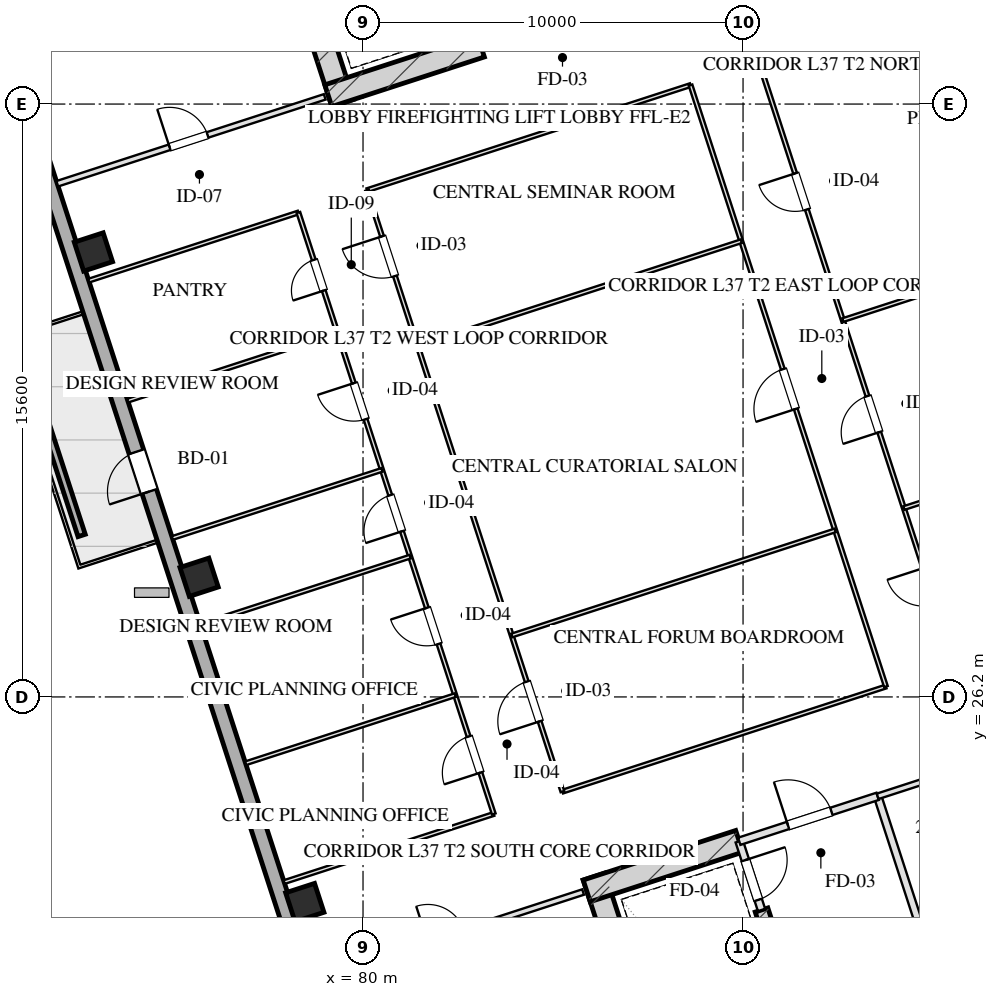
"""IFC4 building model, lengths in metres.
Left out: names, types, materials, properties, quantities, classifications, styles, units other than length and angle.
Written with IfcOpenShell. Run it as: python <this file> out.ifc"""

import sys

from ifc_helpers import new_model, si_unit, direction, frame, frame_2d, origin, origin_2d, place, context, subcontext, project, spatial, rectangle, hollow_rectangle, extrude, element, fill, save


model = new_model("IFC4")
c1 = context("Model", 3, precision=1e-05, world=origin(), true_north=direction((0.0, 1.0)))
c2 = subcontext(c1, "Body", "Model", "MODEL_VIEW")
j1 = project(units=[si_unit("LENGTHUNIT", "METRE"), si_unit("PLANEANGLEUNIT", "RADIAN")], contexts=[c1])
p1 = place(None, origin())
s1 = spatial("IfcSite", under=j1, at=p1, CompositionType="ELEMENT")
p2 = place(p1, origin())
s2 = spatial("IfcBuilding", under=s1, at=p2, CompositionType="ELEMENT")
p3 = place(p2, frame((0.0, 0.0, 142.6)))
s3 = spatial("IfcBuildingStorey", under=s2, at=p3, CompositionType="ELEMENT", Elevation=142.6)
p4 = place(p3, frame((86.078, 21.475, 0.0), z_axis=(0.0, 0.0, 1.0), x_axis=(0.309017938678, -0.951056209472, 0.0)))
e1 = element("IfcWall", 1, at=p4, inside=s3, PredefinedType="SHEAR", context=c2, shape_type="SweptSolid", body=[
    extrude(rectangle(XDim=9.48, YDim=0.6, at=frame_2d((4.74, 0.0))), origin(), (0.0, 0.0, 1.0), 3.45),
])
p5 = place(p3, frame((90.486, 20.594, 0.0), z_axis=(0.0, 0.0, 1.0), x_axis=(0.309020428229, -0.951055400562, 0.0)))
e2 = element("IfcWall", 2, at=p5, inside=s3, PredefinedType="SHEAR", context=c2, shape_type="SweptSolid", body=[
    extrude(rectangle(XDim=6.98, YDim=0.35, at=frame_2d((3.49, 0.0))), origin(), (0.0, 0.0, 1.0), 3.45),
])
p6 = place(p3, frame((85.886, 21.097, 0.0), z_axis=(0.0, 0.0, 1.0), x_axis=(0.951068073652, 0.308981422225, 0.0)))
e3 = element("IfcWall", 3, at=p6, inside=s3, PredefinedType="SHEAR", context=c2, shape_type="SweptSolid", body=[
    extrude(rectangle(XDim=4.22, YDim=0.6, at=frame_2d((2.11, 0.0))), origin(), (0.0, 0.0, 1.0), 3.45),
])
p7 = place(p3, frame((79.466, 41.828, 0.0), z_axis=(0.0, 0.0, 1.0), x_axis=(-0.309041232772, 0.951048640421, 0.0)))
e4 = element("IfcWall", 4, at=p7, inside=s3, PredefinedType="SHEAR", context=c2, shape_type="SweptSolid", body=[
    extrude(rectangle(XDim=9.48, YDim=0.6, at=frame_2d((4.74, 0.0))), origin(), (0.0, 0.0, 1.0), 3.45),
])
p8 = place(p3, frame((79.087, 42.021, 0.0), z_axis=(0.0, 0.0, 1.0), x_axis=(0.951062550203, 0.3089984233, 0.0)))
e5 = element("IfcWall", 5, at=p8, inside=s3, PredefinedType="SHEAR", context=c2, shape_type="SweptSolid", body=[
    extrude(rectangle(XDim=4.22, YDim=0.6, at=frame_2d((2.11, 0.0))), origin(), (0.0, 0.0, 1.0), 3.45),
])
for number, where, z_axis, x_axis in (
    (6, (78.468, 20.79, 0.0), (0.0, 0.0, 1.0), (0.951, 0.309, 0.0)),
    (7, (75.687, 29.349, 0.0), (0.0, 0.0, 1.0), (0.951, 0.309, 0.0)),
    (8, (72.906, 37.909, 0.0), (0.0, 0.0, 1.0), (0.951, 0.309, 0.0)),
):
    element("IfcColumn", number, at=place(p3, frame(where, z_axis=z_axis, x_axis=x_axis)), inside=s3, PredefinedType="COLUMN", context=c2, shape_type="SweptSolid", body=[
        extrude(hollow_rectangle(XDim=0.8, YDim=0.8, WallThickness=0.028, at=origin_2d()), origin(), (0.0, 0.0, 1.0), 3.451),
    ])
p9 = place(p3, frame((81.776, 8.827, 0.0), z_axis=(0.0, 0.0, 1.0), x_axis=(-0.309014228706, 0.951057414911, 0.0)))
e9 = element("IfcWall", 9, at=p9, inside=s3, PredefinedType="SOLIDWALL", context=c2, shape_type="SweptSolid", body=[
    extrude(rectangle(XDim=42.8, YDim=0.4, at=frame_2d((21.4, 0.0))), origin(), (0.0, 0.0, 1.0), 2.61),
])
p10 = place(p9, frame((23.95, 0.0, 0.0)))
e10 = element("IfcOpeningElement", 10, at=p10, cuts=e9, PredefinedType="OPENING", context=c2, shape_type="SweptSolid", body=[
    extrude(rectangle(XDim=1.1, YDim=2.15, at=frame_2d((0.55, 1.075))), frame((0.0, 0.21, 0.0), z_axis=(0.0, -1.0, 0.0), x_axis=(1.0, 0.0, 0.0)), (0.0, 0.0, 1.0), 0.42),
])
p11 = place(p3, frame((72.596, 30.448, 0.0), z_axis=(0.0, 0.0, 1.0), x_axis=(-0.30900096172, 0.951061725471, 0.0)))
e11 = element("IfcWall", 11, at=p11, inside=s3, PredefinedType="PARAPET", context=c2, shape_type="SweptSolid", body=[
    extrude(rectangle(XDim=4.8, YDim=0.2, at=frame_2d((2.4, 0.0))), origin(), (0.0, 0.0, 1.0), 0.75),
])
p12 = place(p3, frame((89.899, 22.401, 0.0), z_axis=(0.0, 0.0, 1.0), x_axis=(0.308932062672, -0.951084108086, 0.0)))
e12 = element("IfcWall", 12, at=p12, inside=s3, PredefinedType="PARTITIONING", context=c2, shape_type="SweptSolid", body=[
    extrude(rectangle(XDim=1.9, YDim=0.2, at=frame_2d((0.95, 0.0))), origin(), (0.0, 0.0, 1.0), 3.175),
])
p13 = place(p12, frame((0.52, 0.0, 0.0)))
e13 = element("IfcOpeningElement", 13, at=p13, cuts=e12, PredefinedType="OPENING", context=c2, shape_type="SweptSolid", body=[
    extrude(rectangle(XDim=1.1, YDim=2.05, at=frame_2d((0.55, 1.025))), frame((0.0, 0.11, 0.0), z_axis=(0.0, -1.0, 0.0), x_axis=(1.0, 0.0, 0.0)), (0.0, 0.0, 1.0), 0.22),
])
p14 = place(p3, frame((93.542, 23.585, 0.0), z_axis=(0.0, 0.0, 1.0), x_axis=(0.309042196757, -0.951048327176, 0.0)))
e14 = element("IfcWall", 14, at=p14, inside=s3, PredefinedType="PARTITIONING", context=c2, shape_type="SweptSolid", body=[
    extrude(rectangle(XDim=8.43, YDim=0.2, at=frame_2d((4.215, 0.0))), origin(), (0.0, 0.0, 1.0), 3.175),
])
p15 = place(p3, frame((89.899, 22.401, 0.0), z_axis=(0.0, 0.0, 1.0), x_axis=(0.951046716504, 0.309047153403, 0.0)))
e15 = element("IfcWall", 15, at=p15, inside=s3, PredefinedType="PARTITIONING", context=c2, shape_type="SweptSolid", body=[
    extrude(rectangle(XDim=3.83, YDim=0.2, at=frame_2d((1.915, 0.0))), origin(), (0.0, 0.0, 1.0), 3.175),
])
p16 = place(p15, frame((1.35, 0.0, 0.0)))
e16 = element("IfcOpeningElement", 16, at=p16, cuts=e15, PredefinedType="OPENING", context=c2, shape_type="SweptSolid", body=[
    extrude(rectangle(XDim=1.2, YDim=2.05, at=frame_2d((0.6, 1.025))), frame((0.0, 0.11, 0.0), z_axis=(0.0, -1.0, 0.0), x_axis=(1.0, 0.0, 0.0)), (0.0, 0.0, 1.0), 0.22),
])
p17 = place(p3, frame((93.542, 23.585, 0.0), z_axis=(0.0, 0.0, 1.0), x_axis=(0.951063829732, 0.308994485023, 0.0)))
e17 = element("IfcWall", 17, at=p17, inside=s3, PredefinedType="PARTITIONING", context=c2, shape_type="SweptSolid", body=[
    extrude(rectangle(XDim=4.4, YDim=0.15, at=frame_2d((2.2, 0.0))), origin(), (0.0, 0.0, 1.0), 3.175),
])
p18 = place(p17, frame((1.6, 0.0, 0.0)))
e18 = element("IfcOpeningElement", 18, at=p18, cuts=e17, PredefinedType="OPENING", context=c2, shape_type="SweptSolid", body=[
    extrude(rectangle(XDim=1.0, YDim=2.05, at=frame_2d((0.5, 1.025))), frame((0.0, 0.085, 0.0), z_axis=(0.0, -1.0, 0.0), x_axis=(1.0, 0.0, 0.0)), (0.0, 0.0, 1.0), 0.17),
])
p19 = place(p3, frame((78.753, 18.78, 0.0), z_axis=(0.0, 0.0, 1.0), x_axis=(0.951060977215, 0.309003264738, 0.0)))
e19 = element("IfcWall", 19, at=p19, inside=s3, PredefinedType="PARTITIONING", context=c2, shape_type="SweptSolid", body=[
    extrude(rectangle(XDim=7.4, YDim=0.15, at=frame_2d((3.7, 0.0))), origin(), (0.0, 0.0, 1.0), 3.175),
])
p20 = place(p19, frame((3.108, 0.0, 0.0)))
e20 = element("IfcOpeningElement", 20, at=p20, cuts=e19, PredefinedType="OPENING", context=c2, shape_type="SweptSolid", body=[
    extrude(rectangle(XDim=1.0, YDim=2.05, at=frame_2d((0.5, 1.025))), frame((0.0, 0.085, 0.0), z_axis=(0.0, -1.0, 0.0), x_axis=(1.0, 0.0, 0.0)), (0.0, 0.0, 1.0), 0.17),
])
p21 = place(p3, frame((71.955, 39.703, 0.0), z_axis=(0.0, 0.0, 1.0), x_axis=(0.951060977215, 0.309003264738, 0.0)))
e21 = element("IfcWall", 21, at=p21, inside=s3, PredefinedType="PARTITIONING", context=c2, shape_type="SweptSolid", body=[
    extrude(rectangle(XDim=7.4, YDim=0.15, at=frame_2d((3.7, 0.0))), origin(), (0.0, 0.0, 1.0), 3.175),
])
p22 = place(p21, frame((3.108, 0.0, 0.0)))
e22 = element("IfcOpeningElement", 22, at=p22, cuts=e21, PredefinedType="OPENING", context=c2, shape_type="SweptSolid", body=[
    extrude(rectangle(XDim=1.05, YDim=2.05, at=frame_2d((0.525, 1.025))), frame((0.0, 0.085, 0.0), z_axis=(0.0, -1.0, 0.0), x_axis=(1.0, 0.0, 0.0)), (0.0, 0.0, 1.0), 0.17),
])
p23 = place(p3, frame((77.925, 21.328, 0.0), z_axis=(0.0, 0.0, 1.0), x_axis=(0.951059431056, 0.309008023519, 0.0)))
e23 = element("IfcWall", 23, at=p23, inside=s3, PredefinedType="MOVABLE", context=c2, shape_type="SweptSolid", body=[
    extrude(rectangle(XDim=5.8, YDim=0.1, at=frame_2d((2.9, 0.0))), origin(), (0.0, 0.0, 1.0), 3.175),
])
p24 = place(p3, frame((85.248, 23.708, 0.0), z_axis=(0.0, 0.0, 1.0), x_axis=(0.951059123431, 0.309008970321, 0.0)))
e24 = element("IfcWall", 24, at=p24, inside=s3, PredefinedType="MOVABLE", context=c2, shape_type="SweptSolid", body=[
    extrude(rectangle(XDim=8.95, YDim=0.1, at=frame_2d((4.475, 0.0))), origin(), (0.0, 0.0, 1.0), 3.175),
])
p25 = place(p3, frame((72.783, 37.154, 0.0), z_axis=(0.0, 0.0, 1.0), x_axis=(0.951047059821, 0.309046096893, 0.0)))
e25 = element("IfcWall", 25, at=p25, inside=s3, PredefinedType="MOVABLE", context=c2, shape_type="SweptSolid", body=[
    extrude(rectangle(XDim=5.8, YDim=0.1, at=frame_2d((2.9, 0.0))), origin(), (0.0, 0.0, 1.0), 3.175),
])
p26 = place(p3, frame((80.106, 39.533, 0.0), z_axis=(0.0, 0.0, 1.0), x_axis=(0.951059123431, 0.309008970321, 0.0)))
e26 = element("IfcWall", 26, at=p26, inside=s3, PredefinedType="MOVABLE", context=c2, shape_type="SweptSolid", body=[
    extrude(rectangle(XDim=8.95, YDim=0.1, at=frame_2d((4.475, 0.0))), origin(), (0.0, 0.0, 1.0), 3.175),
])
p27 = place(p3, frame((90.425, 42.886, 0.0), z_axis=(0.0, 0.0, 1.0), x_axis=(0.95105749975, 0.309013967595, 0.0)))
e27 = element("IfcWall", 27, at=p27, inside=s3, PredefinedType="MOVABLE", context=c2, shape_type="SweptSolid", body=[
    extrude(rectangle(XDim=12.25, YDim=0.1, at=frame_2d((6.125, 0.0))), origin(), (0.0, 0.0, 1.0), 3.175),
])
p28 = place(p3, frame((83.441, 23.121, 0.0), z_axis=(0.0, 0.0, 1.0), x_axis=(-0.30901773025, 0.951056277195, 0.0)))
e28 = element("IfcWall", 28, at=p28, inside=s3, PredefinedType="MOVABLE", context=c2, shape_type="SweptSolid", body=[
    extrude(rectangle(XDim=16.64, YDim=0.1, at=frame_2d((8.32, 0.0))), origin(), (0.0, 0.0, 1.0), 3.175),
])
p29 = place(p28, frame((1.143, 0.0, 0.0)))
e29 = element("IfcOpeningElement", 29, at=p29, cuts=e28, PredefinedType="OPENING", context=c2, shape_type="SweptSolid", body=[
    extrude(rectangle(XDim=1.0, YDim=2.05, at=frame_2d((0.5, 1.025))), frame((0.0, 0.06, 0.0), z_axis=(0.0, -1.0, 0.0), x_axis=(1.0, 0.0, 0.0)), (0.0, 0.0, 1.0), 0.12),
])
p30 = place(p28, frame((4.703, 0.0, 0.0)))
e30 = element("IfcOpeningElement", 30, at=p30, cuts=e28, PredefinedType="OPENING", context=c2, shape_type="SweptSolid", body=[
    extrude(rectangle(XDim=1.0, YDim=2.05, at=frame_2d((0.5, 1.025))), frame((0.0, 0.06, 0.0), z_axis=(0.0, -1.0, 0.0), x_axis=(1.0, 0.0, 0.0)), (0.0, 0.0, 1.0), 0.12),
])
p31 = place(p28, frame((7.82, 0.0, 0.0)))
e31 = element("IfcOpeningElement", 31, at=p31, cuts=e28, PredefinedType="OPENING", context=c2, shape_type="SweptSolid", body=[
    extrude(rectangle(XDim=1.0, YDim=2.05, at=frame_2d((0.5, 1.025))), frame((0.0, 0.06, 0.0), z_axis=(0.0, -1.0, 0.0), x_axis=(1.0, 0.0, 0.0)), (0.0, 0.0, 1.0), 0.12),
])
p32 = place(p28, frame((10.92, 0.0, 0.0)))
e32 = element("IfcOpeningElement", 32, at=p32, cuts=e28, PredefinedType="OPENING", context=c2, shape_type="SweptSolid", body=[
    extrude(rectangle(XDim=1.0, YDim=2.05, at=frame_2d((0.5, 1.025))), frame((0.0, 0.06, 0.0), z_axis=(0.0, -1.0, 0.0), x_axis=(1.0, 0.0, 0.0)), (0.0, 0.0, 1.0), 0.12),
])
p33 = place(p28, frame((14.48, 0.0, 0.0)))
e33 = element("IfcOpeningElement", 33, at=p33, cuts=e28, PredefinedType="OPENING", context=c2, shape_type="SweptSolid", body=[
    extrude(rectangle(XDim=0.85, YDim=2.05, at=frame_2d((0.425, 1.025))), frame((0.0, 0.06, 0.0), z_axis=(0.0, -1.0, 0.0), x_axis=(1.0, 0.0, 0.0)), (0.0, 0.0, 1.0), 0.12),
])
p34 = place(p3, frame((85.248, 23.708, 0.0), z_axis=(0.0, 0.0, 1.0), x_axis=(-0.309004459387, 0.951060589068, 0.0)))
e34 = element("IfcWall", 34, at=p34, inside=s3, PredefinedType="MOVABLE", context=c2, shape_type="SweptSolid", body=[
    extrude(rectangle(XDim=16.64, YDim=0.1, at=frame_2d((8.32, 0.0))), origin(), (0.0, 0.0, 1.0), 3.175),
])
p35 = place(p34, frame((1.944, 0.0, 0.0)))
e35 = element("IfcOpeningElement", 35, at=p35, cuts=e34, PredefinedType="OPENING", context=c2, shape_type="SweptSolid", body=[
    extrude(rectangle(XDim=1.1, YDim=2.05, at=frame_2d((0.55, 1.025))), frame((0.0, 0.06, 0.0), z_axis=(0.0, -1.0, 0.0), x_axis=(1.0, 0.0, 0.0)), (0.0, 0.0, 1.0), 0.12),
])
p36 = place(p34, frame((14.264, 0.0, 0.0)))
e36 = element("IfcOpeningElement", 36, at=p36, cuts=e34, PredefinedType="OPENING", context=c2, shape_type="SweptSolid", body=[
    extrude(rectangle(XDim=1.1, YDim=2.05, at=frame_2d((0.55, 1.025))), frame((0.0, 0.06, 0.0), z_axis=(0.0, -1.0, 0.0), x_axis=(1.0, 0.0, 0.0)), (0.0, 0.0, 1.0), 0.12),
])
p37 = place(p3, frame((93.76, 26.473, 0.0), z_axis=(0.0, 0.0, 1.0), x_axis=(-0.309004459387, 0.951060589068, 0.0)))
e37 = element("IfcWall", 37, at=p37, inside=s3, PredefinedType="MOVABLE", context=c2, shape_type="SweptSolid", body=[
    extrude(rectangle(XDim=16.64, YDim=0.1, at=frame_2d((8.32, 0.0))), origin(), (0.0, 0.0, 1.0), 3.175),
])
p38 = place(p37, frame((7.68, 0.0, 0.0)))
e38 = element("IfcOpeningElement", 38, at=p38, cuts=e37, PredefinedType="OPENING", context=c2, shape_type="SweptSolid", body=[
    extrude(rectangle(XDim=1.1, YDim=2.05, at=frame_2d((0.55, 1.025))), frame((0.0, 0.06, 0.0), z_axis=(0.0, -1.0, 0.0), x_axis=(1.0, 0.0, 0.0)), (0.0, 0.0, 1.0), 0.12),
])
p39 = place(p3, frame((95.567, 27.061, 0.0), z_axis=(0.0, 0.0, 1.0), x_axis=(-0.30901773025, 0.951056277195, 0.0)))
e39 = element("IfcWall", 39, at=p39, inside=s3, PredefinedType="MOVABLE", context=c2, shape_type="SweptSolid", body=[
    extrude(rectangle(XDim=16.64, YDim=0.1, at=frame_2d((8.32, 0.0))), origin(), (0.0, 0.0, 1.0), 3.175),
])
p40 = place(p39, frame((1.66, 0.0, 0.0)))
e40 = element("IfcOpeningElement", 40, at=p40, cuts=e39, PredefinedType="OPENING", context=c2, shape_type="SweptSolid", body=[
    extrude(rectangle(XDim=1.0, YDim=2.05, at=frame_2d((0.5, 1.025))), frame((0.0, 0.06, 0.0), z_axis=(0.0, -1.0, 0.0), x_axis=(1.0, 0.0, 0.0)), (0.0, 0.0, 1.0), 0.12),
])
p41 = place(p39, frame((6.42, 0.0, 0.0)))
e41 = element("IfcOpeningElement", 41, at=p41, cuts=e39, PredefinedType="OPENING", context=c2, shape_type="SweptSolid", body=[
    extrude(rectangle(XDim=1.0, YDim=2.05, at=frame_2d((0.5, 1.025))), frame((0.0, 0.06, 0.0), z_axis=(0.0, -1.0, 0.0), x_axis=(1.0, 0.0, 0.0)), (0.0, 0.0, 1.0), 0.12),
])
p42 = place(p39, frame((12.58, 0.0, 0.0)))
e42 = element("IfcOpeningElement", 42, at=p42, cuts=e39, PredefinedType="OPENING", context=c2, shape_type="SweptSolid", body=[
    extrude(rectangle(XDim=1.0, YDim=2.05, at=frame_2d((0.5, 1.025))), frame((0.0, 0.06, 0.0), z_axis=(0.0, -1.0, 0.0), x_axis=(1.0, 0.0, 0.0)), (0.0, 0.0, 1.0), 0.12),
])
p43 = place(p3, frame((83.913, 27.816, 0.0), z_axis=(0.0, 0.0, 1.0), x_axis=(0.951059123431, 0.309008970321, 0.0)))
e43 = element("IfcWall", 43, at=p43, inside=s3, PredefinedType="MOVABLE", context=c2, shape_type="SweptSolid", body=[
    extrude(rectangle(XDim=8.95, YDim=0.1, at=frame_2d((4.475, 0.0))), origin(), (0.0, 0.0, 1.0), 3.175),
])
p44 = place(p3, frame((81.441, 35.425, 0.0), z_axis=(0.0, 0.0, 1.0), x_axis=(0.951056518616, 0.309016987233, 0.0)))
e44 = element("IfcWall", 44, at=p44, inside=s3, PredefinedType="MOVABLE", context=c2, shape_type="SweptSolid", body=[
    extrude(rectangle(XDim=8.95, YDim=0.1, at=frame_2d((4.475, 0.0))), origin(), (0.0, 0.0, 1.0), 3.175),
])
for number, where, z_axis, x_axis in (
    (45, (76.909, 24.454, 0.0), (0.0, 0.0, 1.0), (0.951, 0.309, 0.0)),
    (46, (75.725, 28.1, 0.0), (0.0, 0.0, 1.0), (0.951, 0.309, 0.0)),
    (47, (74.983, 30.382, 0.0), (0.0, 0.0, 1.0), (0.951, 0.309, 0.0)),
    (48, (73.809, 33.996, 0.0), (0.0, 0.0, 1.0), (0.951, 0.309, 0.0)),
):
    element("IfcWall", number, at=place(p3, frame(where, z_axis=z_axis, x_axis=x_axis)), inside=s3, PredefinedType="MOVABLE", context=c2, shape_type="SweptSolid", body=[
        extrude(rectangle(XDim=5.8, YDim=0.1, at=frame_2d((2.9, 0.0))), origin(), (0.0, 0.0, 1.0), 3.175),
    ])
for number, where, z_axis, x_axis in (
    (49, (94.232, 31.169, 0.0), (0.0, 0.0, 1.0), (0.951, 0.309, 0.0)),
    (50, (92.625, 36.115, 0.0), (0.0, 0.0, 1.0), (0.951, 0.309, 0.0)),
):
    element("IfcWall", number, at=place(p3, frame(where, z_axis=z_axis, x_axis=x_axis)), inside=s3, PredefinedType="MOVABLE", context=c2, shape_type="SweptSolid", body=[
        extrude(rectangle(XDim=12.25, YDim=0.1, at=frame_2d((6.125, 0.0))), origin(), (0.0, 0.0, 1.0), 3.175),
    ])
p45 = place(p10, origin())
e51 = element("IfcDoor", 51, at=p45, inside=s3, OperationType="SINGLE_SWING_LEFT", PredefinedType="DOOR", context=c2, shape_type="SweptSolid", body=[
    extrude(rectangle(XDim=1.1, YDim=2.15, at=frame_2d((0.55, 1.075))), frame((0.0, 0.025, 0.0), z_axis=(0.0, -1.0, 0.0), x_axis=(1.0, 0.0, 0.0)), (0.0, 0.0, 1.0), 0.05),
])
fill(e10, e51)
p46 = place(p13, origin())
e52 = element("IfcDoor", 52, at=p46, inside=s3, OperationType="SINGLE_SWING_LEFT", PredefinedType="DOOR", context=c2, shape_type="SweptSolid", body=[
    extrude(rectangle(XDim=1.1, YDim=2.05, at=frame_2d((0.55, 1.025))), frame((0.0, 0.025, 0.0), z_axis=(0.0, -1.0, 0.0), x_axis=(1.0, 0.0, 0.0)), (0.0, 0.0, 1.0), 0.05),
])
fill(e13, e52)
p47 = place(p16, origin())
e53 = element("IfcDoor", 53, at=p47, inside=s3, OperationType="SINGLE_SWING_LEFT", PredefinedType="DOOR", context=c2, shape_type="SweptSolid", body=[
    extrude(rectangle(XDim=1.2, YDim=2.05, at=frame_2d((0.6, 1.025))), frame((0.0, 0.025, 0.0), z_axis=(0.0, -1.0, 0.0), x_axis=(1.0, 0.0, 0.0)), (0.0, 0.0, 1.0), 0.05),
])
fill(e16, e53)
p48 = place(p22, origin())
e54 = element("IfcDoor", 54, at=p48, inside=s3, OperationType="SINGLE_SWING_LEFT", PredefinedType="DOOR", context=c2, shape_type="SweptSolid", body=[
    extrude(rectangle(XDim=1.05, YDim=2.05, at=frame_2d((0.525, 1.025))), frame((0.0, 0.025, 0.0), z_axis=(0.0, -1.0, 0.0), x_axis=(1.0, 0.0, 0.0)), (0.0, 0.0, 1.0), 0.05),
])
fill(e22, e54)
p49 = place(p29, origin())
e55 = element("IfcDoor", 55, at=p49, inside=s3, OperationType="SINGLE_SWING_LEFT", PredefinedType="DOOR", context=c2, shape_type="SweptSolid", body=[
    extrude(rectangle(XDim=1.0, YDim=2.05, at=frame_2d((0.5, 1.025))), frame((0.0, 0.025, 0.0), z_axis=(0.0, -1.0, 0.0), x_axis=(1.0, 0.0, 0.0)), (0.0, 0.0, 1.0), 0.05),
])
fill(e29, e55)
p50 = place(p30, origin())
e56 = element("IfcDoor", 56, at=p50, inside=s3, OperationType="SINGLE_SWING_RIGHT", PredefinedType="DOOR", context=c2, shape_type="SweptSolid", body=[
    extrude(rectangle(XDim=1.0, YDim=2.05, at=frame_2d((0.5, 1.025))), frame((0.0, 0.025, 0.0), z_axis=(0.0, -1.0, 0.0), x_axis=(1.0, 0.0, 0.0)), (0.0, 0.0, 1.0), 0.05),
])
fill(e30, e56)
p51 = place(p31, origin())
e57 = element("IfcDoor", 57, at=p51, inside=s3, OperationType="SINGLE_SWING_LEFT", PredefinedType="DOOR", context=c2, shape_type="SweptSolid", body=[
    extrude(rectangle(XDim=1.0, YDim=2.05, at=frame_2d((0.5, 1.025))), frame((0.0, 0.025, 0.0), z_axis=(0.0, -1.0, 0.0), x_axis=(1.0, 0.0, 0.0)), (0.0, 0.0, 1.0), 0.05),
])
fill(e31, e57)
p52 = place(p32, origin())
e58 = element("IfcDoor", 58, at=p52, inside=s3, OperationType="SINGLE_SWING_RIGHT", PredefinedType="DOOR", context=c2, shape_type="SweptSolid", body=[
    extrude(rectangle(XDim=1.0, YDim=2.05, at=frame_2d((0.5, 1.025))), frame((0.0, 0.025, 0.0), z_axis=(0.0, -1.0, 0.0), x_axis=(1.0, 0.0, 0.0)), (0.0, 0.0, 1.0), 0.05),
])
fill(e32, e58)
p53 = place(p33, origin())
e59 = element("IfcDoor", 59, at=p53, inside=s3, OperationType="SINGLE_SWING_LEFT", PredefinedType="DOOR", context=c2, shape_type="SweptSolid", body=[
    extrude(rectangle(XDim=0.85, YDim=2.05, at=frame_2d((0.425, 1.025))), frame((0.0, 0.025, 0.0), z_axis=(0.0, -1.0, 0.0), x_axis=(1.0, 0.0, 0.0)), (0.0, 0.0, 1.0), 0.05),
])
fill(e33, e59)
p54 = place(p35, origin())
e60 = element("IfcDoor", 60, at=p54, inside=s3, OperationType="SINGLE_SWING_LEFT", PredefinedType="DOOR", context=c2, shape_type="SweptSolid", body=[
    extrude(rectangle(XDim=1.1, YDim=2.05, at=frame_2d((0.55, 1.025))), frame((0.0, 0.025, 0.0), z_axis=(0.0, -1.0, 0.0), x_axis=(1.0, 0.0, 0.0)), (0.0, 0.0, 1.0), 0.05),
])
fill(e35, e60)
p55 = place(p36, origin())
e61 = element("IfcDoor", 61, at=p55, inside=s3, OperationType="SINGLE_SWING_RIGHT", PredefinedType="DOOR", context=c2, shape_type="SweptSolid", body=[
    extrude(rectangle(XDim=1.1, YDim=2.05, at=frame_2d((0.55, 1.025))), frame((0.0, 0.025, 0.0), z_axis=(0.0, -1.0, 0.0), x_axis=(1.0, 0.0, 0.0)), (0.0, 0.0, 1.0), 0.05),
])
fill(e36, e61)
p56 = place(p38, origin())
e62 = element("IfcDoor", 62, at=p56, inside=s3, OperationType="SINGLE_SWING_LEFT", PredefinedType="DOOR", context=c2, shape_type="SweptSolid", body=[
    extrude(rectangle(XDim=1.1, YDim=2.05, at=frame_2d((0.55, 1.025))), frame((0.0, 0.025, 0.0), z_axis=(0.0, -1.0, 0.0), x_axis=(1.0, 0.0, 0.0)), (0.0, 0.0, 1.0), 0.05),
])
fill(e38, e62)
p57 = place(p41, origin())
e63 = element("IfcDoor", 63, at=p57, inside=s3, OperationType="SINGLE_SWING_LEFT", PredefinedType="DOOR", context=c2, shape_type="SweptSolid", body=[
    extrude(rectangle(XDim=1.0, YDim=2.05, at=frame_2d((0.5, 1.025))), frame((0.0, 0.025, 0.0), z_axis=(0.0, -1.0, 0.0), x_axis=(1.0, 0.0, 0.0)), (0.0, 0.0, 1.0), 0.05),
])
fill(e41, e63)
p58 = place(p42, origin())
e64 = element("IfcDoor", 64, at=p58, inside=s3, OperationType="SINGLE_SWING_RIGHT", PredefinedType="DOOR", context=c2, shape_type="SweptSolid", body=[
    extrude(rectangle(XDim=1.0, YDim=2.05, at=frame_2d((0.5, 1.025))), frame((0.0, 0.025, 0.0), z_axis=(0.0, -1.0, 0.0), x_axis=(1.0, 0.0, 0.0)), (0.0, 0.0, 1.0), 0.05),
])
fill(e42, e64)
save(model, sys.argv[1])
